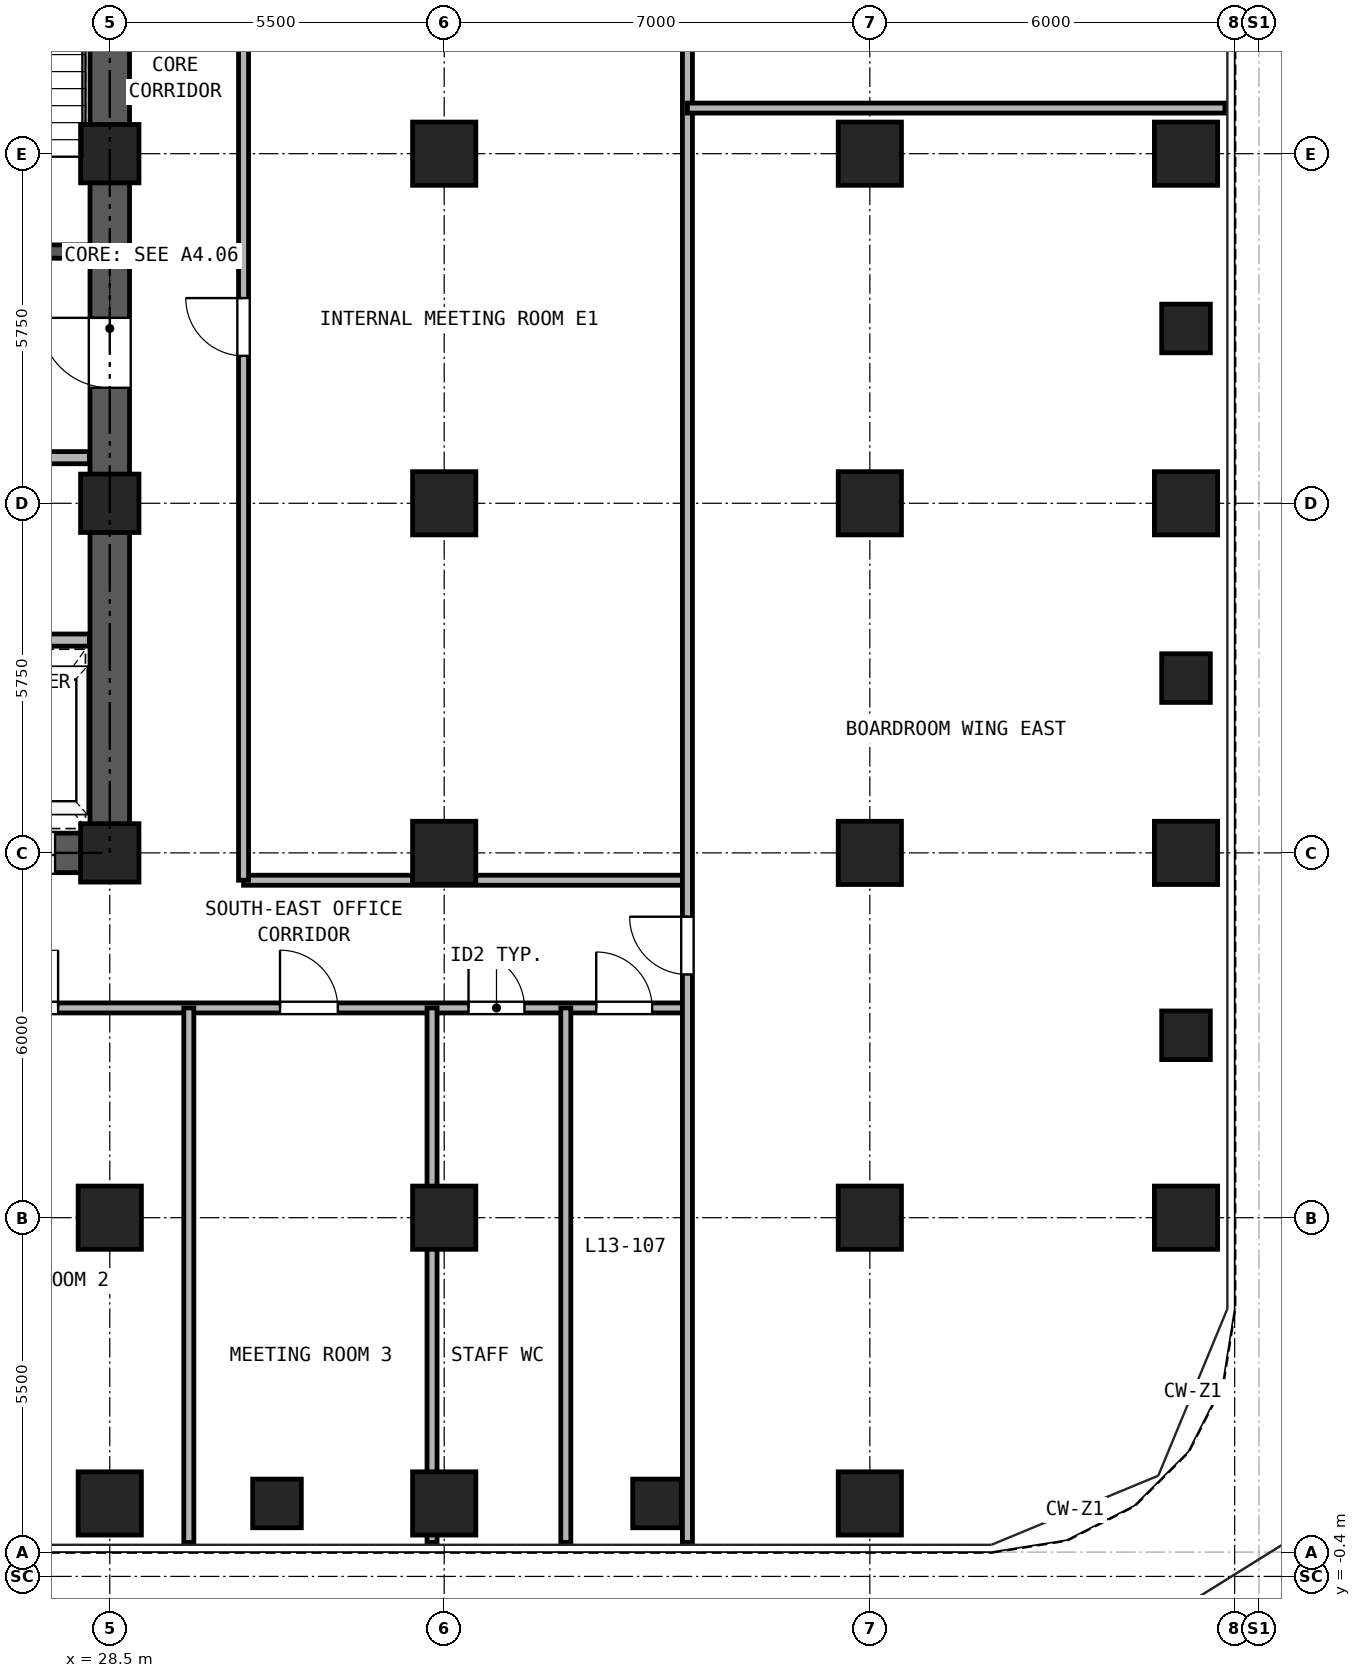
"""IFC4 building model, lengths in metres.
Left out: names, types, materials, properties, quantities, classifications, styles, units other than length and angle.
Written with IfcOpenShell. Run it as: python <this file> out.ifc"""

import sys

from ifc_helpers import new_model, si_unit, direction, frame, frame_2d, origin, origin_2d, place, context, subcontext, project, spatial, rectangle, hollow_rectangle, extrude, source, transform, mapped, element, fill, save


model = new_model("IFC4")
c1 = context("Model", 3, precision=1e-05, world=origin(), true_north=direction((0.0, 1.0)))
c2 = subcontext(c1, "Body", "Model", "MODEL_VIEW")
j1 = project(units=[si_unit("LENGTHUNIT", "METRE"), si_unit("PLANEANGLEUNIT", "RADIAN")], contexts=[c1])
p1 = place(None, origin())
s1 = spatial("IfcSite", under=j1, at=p1, CompositionType="ELEMENT")
p2 = place(p1, origin())
s2 = spatial("IfcBuilding", under=s1, at=p2, CompositionType="ELEMENT")
p3 = place(p2, frame((0.0, 0.0, 51.3)))
s3 = spatial("IfcBuildingStorey", under=s2, at=p3, CompositionType="ELEMENT", Elevation=51.3)
m1 = source(origin(), c2, "Body", "SweptSolid", [
    extrude(hollow_rectangle(XDim=1.04, YDim=1.04, WallThickness=0.065, at=origin_2d()), origin(), (0.0, 0.0, 1.0), 3.32),
])
for number, where, z_axis, x_axis in (
    (1, (28.5, 0.8, 0.0), (0.0, 0.0, 1.0), (1.0, 0.0, 0.0)),
    (2, (34.0, 0.8, 0.0), (0.0, 0.0, 1.0), (1.0, 0.0, 0.0)),
    (3, (41.0, 0.8, 0.0), (0.0, 0.0, 1.0), (1.0, 0.0, 0.0)),
    (4, (46.2, 5.5, 0.0), (0.0, 0.0, 1.0), (1.0, 0.0, 0.0)),
    (5, (46.2, 11.5, 0.0), (0.0, 0.0, 1.0), (1.0, 0.0, 0.0)),
    (6, (46.2, 17.25, 0.0), (0.0, 0.0, 1.0), (1.0, 0.0, 0.0)),
    (7, (46.2, 23.0, 0.0), (0.0, 0.0, 1.0), (1.0, 0.0, 0.0)),
    (8, (28.5, 5.5, 0.0), (0.0, 0.0, 1.0), (1.0, 0.0, 0.0)),
):
    element("IfcColumn", number, at=place(p3, frame(where, z_axis=z_axis, x_axis=x_axis)), inside=s3, PredefinedType="COLUMN", context=c2, shape_type="MappedRepresentation", body=[
        mapped(m1, transform((0.0, 0.0, 0.0), x_axis=(1.0, 0.0, 0.0), y_axis=(0.0, 1.0, 0.0), z_axis=(0.0, 0.0, 1.0), scale=1.0)),
    ])
m2 = source(origin(), c2, "Body", "SweptSolid", [
    extrude(hollow_rectangle(XDim=0.96, YDim=0.96, WallThickness=0.06, at=origin_2d()), origin(), (0.0, 0.0, 1.0), 3.32),
])
for number, where, z_axis, x_axis in (
    (9, (28.5, 11.5, 0.0), (0.0, 0.0, 1.0), (1.0, 0.0, 0.0)),
    (10, (28.5, 17.25, 0.0), (0.0, 0.0, 1.0), (1.0, 0.0, 0.0)),
    (11, (28.5, 23.0, 0.0), (0.0, 0.0, 1.0), (1.0, 0.0, 0.0)),
):
    element("IfcColumn", number, at=place(p3, frame(where, z_axis=z_axis, x_axis=x_axis)), inside=s3, PredefinedType="COLUMN", context=c2, shape_type="MappedRepresentation", body=[
        mapped(m2, transform((0.0, 0.0, 0.0), x_axis=(1.0, 0.0, 0.0), y_axis=(0.0, 1.0, 0.0), z_axis=(0.0, 0.0, 1.0), scale=1.0)),
    ])
for number, where, z_axis, x_axis in (
    (12, (34.0, 5.5, 0.0), (0.0, 0.0, 1.0), (1.0, 0.0, 0.0)),
    (13, (34.0, 11.5, 0.0), (0.0, 0.0, 1.0), (1.0, 0.0, 0.0)),
    (14, (34.0, 17.25, 0.0), (0.0, 0.0, 1.0), (1.0, 0.0, 0.0)),
    (15, (34.0, 23.0, 0.0), (0.0, 0.0, 1.0), (1.0, 0.0, 0.0)),
    (16, (41.0, 5.5, 0.0), (0.0, 0.0, 1.0), (1.0, 0.0, 0.0)),
    (17, (41.0, 11.5, 0.0), (0.0, 0.0, 1.0), (1.0, 0.0, 0.0)),
    (18, (41.0, 17.25, 0.0), (0.0, 0.0, 1.0), (1.0, 0.0, 0.0)),
    (19, (41.0, 23.0, 0.0), (0.0, 0.0, 1.0), (1.0, 0.0, 0.0)),
):
    element("IfcColumn", number, at=place(p3, frame(where, z_axis=z_axis, x_axis=x_axis)), inside=s3, PredefinedType="COLUMN", context=c2, shape_type="MappedRepresentation", body=[
        mapped(m1, transform((0.0, 0.0, 0.0), x_axis=(1.0, 0.0, 0.0), y_axis=(0.0, 1.0, 0.0), z_axis=(0.0, 0.0, 1.0), scale=1.0)),
    ])
m3 = source(origin(), c2, "Body", "SweptSolid", [
    extrude(hollow_rectangle(XDim=0.8, YDim=0.8, WallThickness=0.045, at=origin_2d()), origin(), (0.0, 0.0, 1.0), 3.32),
])
for number, where, z_axis, x_axis in (
    (20, (31.25, 0.8, 0.0), (0.0, 0.0, 1.0), (1.0, 0.0, 0.0)),
    (21, (37.5, 0.8, 0.0), (0.0, 0.0, 1.0), (1.0, 0.0, 0.0)),
    (22, (46.2, 8.5, 0.0), (0.0, 0.0, 1.0), (1.0, 0.0, 0.0)),
    (23, (46.2, 14.375, 0.0), (0.0, 0.0, 1.0), (1.0, 0.0, 0.0)),
    (24, (46.2, 20.125, 0.0), (0.0, 0.0, 1.0), (1.0, 0.0, 0.0)),
):
    element("IfcColumn", number, at=place(p3, frame(where, z_axis=z_axis, x_axis=x_axis)), inside=s3, PredefinedType="COLUMN", context=c2, shape_type="MappedRepresentation", body=[
        mapped(m3, transform((0.0, 0.0, 0.0), x_axis=(1.0, 0.0, 0.0), y_axis=(0.0, 1.0, 0.0), z_axis=(0.0, 0.0, 1.0), scale=1.0)),
    ])
p4 = place(p3, frame((18.175, 11.5, 0.0), z_axis=(0.0, 0.0, 1.0), x_axis=(1.0, 0.0, 0.0)))
e25 = element("IfcWall", 25, at=p4, inside=s3, PredefinedType="SHEAR", context=c2, shape_type="SweptSolid", body=[
    extrude(rectangle(XDim=10.65, YDim=0.65, at=frame_2d((5.325, 0.0))), origin(), (0.0, 0.0, 1.0), 3.32),
])
p5 = place(p4, frame((1.195, 0.0, 0.0)))
e26 = element("IfcOpeningElement", 26, at=p5, cuts=e25, PredefinedType="OPENING", context=c2, shape_type="SweptSolid", body=[
    extrude(rectangle(XDim=1.1, YDim=2.25, at=frame_2d((0.55, 1.125))), frame((0.0, 0.335, 0.0), z_axis=(0.0, -1.0, 0.0), x_axis=(1.0, 0.0, 0.0)), (0.0, 0.0, 1.0), 0.67),
])
p6 = place(p4, frame((3.495, 0.0, 0.0)))
e27 = element("IfcOpeningElement", 27, at=p6, cuts=e25, PredefinedType="OPENING", context=c2, shape_type="SweptSolid", body=[
    extrude(rectangle(XDim=1.1, YDim=2.25, at=frame_2d((0.55, 1.125))), frame((0.0, 0.335, 0.0), z_axis=(0.0, -1.0, 0.0), x_axis=(1.0, 0.0, 0.0)), (0.0, 0.0, 1.0), 0.67),
])
p7 = place(p4, frame((5.925, 0.0, 0.0)))
e28 = element("IfcOpeningElement", 28, at=p7, cuts=e25, PredefinedType="OPENING", context=c2, shape_type="SweptSolid", body=[
    extrude(rectangle(XDim=1.1, YDim=2.25, at=frame_2d((0.55, 1.125))), frame((0.0, 0.335, 0.0), z_axis=(0.0, -1.0, 0.0), x_axis=(1.0, 0.0, 0.0)), (0.0, 0.0, 1.0), 0.67),
])
p8 = place(p4, frame((8.325, 0.0, 0.0)))
e29 = element("IfcOpeningElement", 29, at=p8, cuts=e25, PredefinedType="OPENING", context=c2, shape_type="SweptSolid", body=[
    extrude(rectangle(XDim=1.1, YDim=2.25, at=frame_2d((0.55, 1.125))), frame((0.0, 0.335, 0.0), z_axis=(0.0, -1.0, 0.0), x_axis=(1.0, 0.0, 0.0)), (0.0, 0.0, 1.0), 0.67),
])
p9 = place(p3, frame((28.5, 11.825, 0.0), z_axis=(0.0, 0.0, 1.0), x_axis=(0.0, 1.0, 0.0)))
e30 = element("IfcWall", 30, at=p9, inside=s3, PredefinedType="SHEAR", context=c2, shape_type="SweptSolid", body=[
    extrude(rectangle(XDim=16.6, YDim=0.65, at=frame_2d((8.3, 0.0))), origin(), (0.0, 0.0, 1.0), 3.32),
])
p10 = place(p9, frame((7.325, 0.0, 0.0)))
e31 = element("IfcOpeningElement", 31, at=p10, cuts=e30, PredefinedType="OPENING", context=c2, shape_type="SweptSolid", body=[
    extrude(rectangle(XDim=1.15, YDim=2.2, at=frame_2d((0.575, 1.1))), frame((0.0, 0.335, 0.0), z_axis=(0.0, -1.0, 0.0), x_axis=(1.0, 0.0, 0.0)), (0.0, 0.0, 1.0), 0.67),
])
p11 = place(p3, frame((25.13, 21.39, 0.0), z_axis=(0.0, 0.0, 1.0), x_axis=(1.0, 0.0, 0.0)))
e32 = element("IfcWall", 32, at=p11, inside=s3, PredefinedType="SOLIDWALL", context=c2, shape_type="SweptSolid", body=[
    extrude(rectangle(XDim=3.035, YDim=0.22, at=frame_2d((1.518, 0.0))), origin(), (0.0, 0.0, 1.0), 3.32),
])
p12 = place(p11, frame((0.92, 0.0, 0.0)))
e33 = element("IfcOpeningElement", 33, at=p12, cuts=e32, PredefinedType="OPENING", context=c2, shape_type="SweptSolid", body=[
    extrude(rectangle(XDim=1.15, YDim=2.2, at=frame_2d((0.575, 1.1))), frame((0.0, 0.12, 0.0), z_axis=(0.0, -1.0, 0.0), x_axis=(1.0, 0.0, 0.0)), (0.0, 0.0, 1.0), 0.24),
])
p13 = place(p3, frame((18.835, 18.0, 0.0), z_axis=(0.0, 0.0, 1.0), x_axis=(1.0, 0.0, 0.0)))
e34 = element("IfcWall", 34, at=p13, inside=s3, PredefinedType="PARTITIONING", context=c2, shape_type="SweptSolid", body=[
    extrude(rectangle(XDim=9.33, YDim=0.2, at=frame_2d((4.665, 0.0))), origin(), (0.0, 0.0, 1.0), 3.32),
])
p14 = place(p13, frame((0.415, 0.0, 0.0)))
e35 = element("IfcOpeningElement", 35, at=p14, cuts=e34, PredefinedType="OPENING", context=c2, shape_type="SweptSolid", body=[
    extrude(rectangle(XDim=1.3, YDim=2.3, at=frame_2d((0.65, 1.15))), frame((0.0, 0.11, 0.0), z_axis=(0.0, -1.0, 0.0), x_axis=(1.0, 0.0, 0.0)), (0.0, 0.0, 1.0), 0.22),
])
p15 = place(p13, frame((2.515, 0.0, 0.0)))
e36 = element("IfcOpeningElement", 36, at=p15, cuts=e34, PredefinedType="OPENING", context=c2, shape_type="SweptSolid", body=[
    extrude(rectangle(XDim=1.3, YDim=2.3, at=frame_2d((0.65, 1.15))), frame((0.0, 0.11, 0.0), z_axis=(0.0, -1.0, 0.0), x_axis=(1.0, 0.0, 0.0)), (0.0, 0.0, 1.0), 0.22),
])
p16 = place(p13, frame((7.015, 0.0, 0.0)))
e37 = element("IfcOpeningElement", 37, at=p16, cuts=e34, PredefinedType="OPENING", context=c2, shape_type="SweptSolid", body=[
    extrude(rectangle(XDim=1.0, YDim=2.15, at=frame_2d((0.5, 1.075))), frame((0.0, 0.11, 0.0), z_axis=(0.0, -1.0, 0.0), x_axis=(1.0, 0.0, 0.0)), (0.0, 0.0, 1.0), 0.22),
])
p17 = place(p3, frame((18.835, 15.0, 0.0), z_axis=(0.0, 0.0, 1.0), x_axis=(1.0, 0.0, 0.0)))
e38 = element("IfcWall", 38, at=p17, inside=s3, PredefinedType="PARTITIONING", context=c2, shape_type="SweptSolid", body=[
    extrude(rectangle(XDim=9.33, YDim=0.2, at=frame_2d((4.665, 0.0))), origin(), (0.0, 0.0, 1.0), 3.32),
])
p18 = place(p3, frame((9.0, 8.95, 0.0), z_axis=(0.0, 0.0, 1.0), x_axis=(1.0, 0.0, 0.0)))
e39 = element("IfcWall", 39, at=p18, inside=s3, PredefinedType="PARTITIONING", context=c2, shape_type="SweptSolid", body=[
    extrude(rectangle(XDim=29.0, YDim=0.165, at=frame_2d((14.5, 0.0))), origin(), (0.0, 0.0, 1.0), 3.32),
])
p19 = place(p18, frame((2.1, 0.0, 0.0)))
e40 = element("IfcOpeningElement", 40, at=p19, cuts=e39, PredefinedType="OPENING", context=c2, shape_type="SweptSolid", body=[
    extrude(rectangle(XDim=0.95, YDim=2.15, at=frame_2d((0.475, 1.075))), frame((0.0, 0.093, 0.0), z_axis=(0.0, -1.0, 0.0), x_axis=(1.0, 0.0, 0.0)), (0.0, 0.0, 1.0), 0.185),
])
p20 = place(p18, frame((7.3, 0.0, 0.0)))
e41 = element("IfcOpeningElement", 41, at=p20, cuts=e39, PredefinedType="OPENING", context=c2, shape_type="SweptSolid", body=[
    extrude(rectangle(XDim=0.95, YDim=2.15, at=frame_2d((0.475, 1.075))), frame((0.0, 0.093, 0.0), z_axis=(0.0, -1.0, 0.0), x_axis=(1.0, 0.0, 0.0)), (0.0, 0.0, 1.0), 0.185),
])
p21 = place(p18, frame((12.5, 0.0, 0.0)))
e42 = element("IfcOpeningElement", 42, at=p21, cuts=e39, PredefinedType="OPENING", context=c2, shape_type="SweptSolid", body=[
    extrude(rectangle(XDim=0.95, YDim=2.15, at=frame_2d((0.475, 1.075))), frame((0.0, 0.093, 0.0), z_axis=(0.0, -1.0, 0.0), x_axis=(1.0, 0.0, 0.0)), (0.0, 0.0, 1.0), 0.185),
])
p22 = place(p18, frame((17.7, 0.0, 0.0)))
e43 = element("IfcOpeningElement", 43, at=p22, cuts=e39, PredefinedType="OPENING", context=c2, shape_type="SweptSolid", body=[
    extrude(rectangle(XDim=0.95, YDim=2.15, at=frame_2d((0.475, 1.075))), frame((0.0, 0.093, 0.0), z_axis=(0.0, -1.0, 0.0), x_axis=(1.0, 0.0, 0.0)), (0.0, 0.0, 1.0), 0.185),
])
p23 = place(p18, frame((22.3, 0.0, 0.0)))
e44 = element("IfcOpeningElement", 44, at=p23, cuts=e39, PredefinedType="OPENING", context=c2, shape_type="SweptSolid", body=[
    extrude(rectangle(XDim=0.95, YDim=2.15, at=frame_2d((0.475, 1.075))), frame((0.0, 0.093, 0.0), z_axis=(0.0, -1.0, 0.0), x_axis=(1.0, 0.0, 0.0)), (0.0, 0.0, 1.0), 0.185),
])
p24 = place(p18, frame((25.4, 0.0, 0.0)))
e45 = element("IfcOpeningElement", 45, at=p24, cuts=e39, PredefinedType="OPENING", context=c2, shape_type="SweptSolid", body=[
    extrude(rectangle(XDim=0.92, YDim=2.1, at=frame_2d((0.46, 1.05))), frame((0.0, 0.093, 0.0), z_axis=(0.0, -1.0, 0.0), x_axis=(1.0, 0.0, 0.0)), (0.0, 0.0, 1.0), 0.185),
])
p25 = place(p18, frame((27.5, 0.0, 0.0)))
e46 = element("IfcOpeningElement", 46, at=p25, cuts=e39, PredefinedType="OPENING", context=c2, shape_type="SweptSolid", body=[
    extrude(rectangle(XDim=0.92, YDim=2.1, at=frame_2d((0.46, 1.05))), frame((0.0, 0.093, 0.0), z_axis=(0.0, -1.0, 0.0), x_axis=(1.0, 0.0, 0.0)), (0.0, 0.0, 1.0), 0.185),
])
p26 = place(p3, frame((30.7, 11.05, 0.0), z_axis=(0.0, 0.0, 1.0), x_axis=(1.0, 0.0, 0.0)))
e47 = element("IfcWall", 47, at=p26, inside=s3, PredefinedType="PARTITIONING", context=c2, shape_type="SweptSolid", body=[
    extrude(rectangle(XDim=7.3, YDim=0.165, at=frame_2d((3.65, 0.0))), origin(), (0.0, 0.0, 1.0), 3.32),
])
p27 = place(p3, frame((30.7, 11.05, 0.0), z_axis=(0.0, 0.0, 1.0), x_axis=(0.0, 1.0, 0.0)))
e48 = element("IfcWall", 48, at=p27, inside=s3, PredefinedType="PARTITIONING", context=c2, shape_type="SweptSolid", body=[
    extrude(rectangle(XDim=18.25, YDim=0.165, at=frame_2d((9.125, 0.0))), origin(), (0.0, 0.0, 1.0), 3.32),
])
p28 = place(p27, frame((8.625, 0.0, 0.0)))
e49 = element("IfcOpeningElement", 49, at=p28, cuts=e48, PredefinedType="OPENING", context=c2, shape_type="SweptSolid", body=[
    extrude(rectangle(XDim=0.95, YDim=2.15, at=frame_2d((0.475, 1.075))), frame((0.0, 0.093, 0.0), z_axis=(0.0, -1.0, 0.0), x_axis=(1.0, 0.0, 0.0)), (0.0, 0.0, 1.0), 0.185),
])
p29 = place(p3, frame((38.0, 0.16, 0.0), z_axis=(0.0, 0.0, 1.0), x_axis=(0.0, 1.0, 0.0)))
e50 = element("IfcWall", 50, at=p29, inside=s3, PredefinedType="PARTITIONING", context=c2, shape_type="SweptSolid", body=[
    extrude(rectangle(XDim=40.18, YDim=0.165, at=frame_2d((20.09, 0.0))), origin(), (0.0, 0.0, 1.0), 3.32),
])
p30 = place(p29, frame((9.34, 0.0, 0.0)))
e51 = element("IfcOpeningElement", 51, at=p30, cuts=e50, PredefinedType="OPENING", context=c2, shape_type="SweptSolid", body=[
    extrude(rectangle(XDim=0.95, YDim=2.15, at=frame_2d((0.475, 1.075))), frame((0.0, 0.093, 0.0), z_axis=(0.0, -1.0, 0.0), x_axis=(1.0, 0.0, 0.0)), (0.0, 0.0, 1.0), 0.185),
])
p31 = place(p29, frame((29.69, 0.0, 0.0)))
e52 = element("IfcOpeningElement", 52, at=p31, cuts=e50, PredefinedType="OPENING", context=c2, shape_type="SweptSolid", body=[
    extrude(rectangle(XDim=0.95, YDim=2.15, at=frame_2d((0.475, 1.075))), frame((0.0, 0.093, 0.0), z_axis=(0.0, -1.0, 0.0), x_axis=(1.0, 0.0, 0.0)), (0.0, 0.0, 1.0), 0.185),
])
p32 = place(p3, frame((29.8, 0.16, 0.0), z_axis=(0.0, 0.0, 1.0), x_axis=(0.0, 1.0, 0.0)))
e53 = element("IfcWall", 53, at=p32, inside=s3, PredefinedType="PARTITIONING", context=c2, shape_type="SweptSolid", body=[
    extrude(rectangle(XDim=8.79, YDim=0.165, at=frame_2d((4.395, 0.0))), origin(), (0.0, 0.0, 1.0), 3.32),
])
p33 = place(p3, frame((33.8, 0.16, 0.0), z_axis=(0.0, 0.0, 1.0), x_axis=(0.0, 1.0, 0.0)))
e54 = element("IfcWall", 54, at=p33, inside=s3, PredefinedType="PARTITIONING", context=c2, shape_type="SweptSolid", body=[
    extrude(rectangle(XDim=8.79, YDim=0.165, at=frame_2d((4.395, 0.0))), origin(), (0.0, 0.0, 1.0), 2.539),
])
p34 = place(p3, frame((36.0, 0.16, 0.0), z_axis=(0.0, 0.0, 1.0), x_axis=(0.0, 1.0, 0.0)))
e55 = element("IfcWall", 55, at=p34, inside=s3, PredefinedType="PARTITIONING", context=c2, shape_type="SweptSolid", body=[
    extrude(rectangle(XDim=8.79, YDim=0.165, at=frame_2d((4.395, 0.0))), origin(), (0.0, 0.0, 1.0), 3.32),
])
p35 = place(p3, frame((38.0, 23.75, 0.0), z_axis=(0.0, 0.0, 1.0), x_axis=(1.0, 0.0, 0.0)))
e56 = element("IfcWall", 56, at=p35, inside=s3, PredefinedType="PARTITIONING", context=c2, shape_type="SweptSolid", body=[
    extrude(rectangle(XDim=8.84, YDim=0.165, at=frame_2d((4.42, 0.0))), origin(), (0.0, 0.0, 1.0), 3.32),
])
p36 = place(p10, origin())
e57 = element("IfcDoor", 57, at=p36, inside=s3, OperationType="SINGLE_SWING_RIGHT", PredefinedType="DOOR", context=c2, shape_type="SweptSolid", body=[
    extrude(rectangle(XDim=1.15, YDim=2.2, at=frame_2d((0.575, 1.1))), frame((0.0, 0.025, 0.0), z_axis=(0.0, -1.0, 0.0), x_axis=(1.0, 0.0, 0.0)), (0.0, 0.0, 1.0), 0.05),
])
fill(e31, e57)
p37 = place(p8, frame((1.1, 0.0, 0.0), z_axis=(0.0, 0.0, 1.0), x_axis=(-1.0, 0.0, 0.0)))
e58 = element("IfcDoor", 58, at=p37, inside=s3, OperationType="DOUBLE_DOOR_SLIDING", PredefinedType="DOOR", context=c2, shape_type="SweptSolid", body=[
    extrude(rectangle(XDim=1.1, YDim=2.25, at=frame_2d((0.55, 1.125))), frame((0.0, 0.025, 0.0), z_axis=(0.0, -1.0, 0.0), x_axis=(1.0, 0.0, 0.0)), (0.0, 0.0, 1.0), 0.05),
])
fill(e29, e58)
p38 = place(p22, frame((0.95, 0.0, 0.0), z_axis=(0.0, 0.0, 1.0), x_axis=(-1.0, 0.0, 0.0)))
e59 = element("IfcDoor", 59, at=p38, inside=s3, OperationType="SINGLE_SWING_RIGHT", PredefinedType="DOOR", context=c2, shape_type="SweptSolid", body=[
    extrude(rectangle(XDim=0.95, YDim=2.15, at=frame_2d((0.475, 1.075))), frame((0.0, 0.025, 0.0), z_axis=(0.0, -1.0, 0.0), x_axis=(1.0, 0.0, 0.0)), (0.0, 0.0, 1.0), 0.05),
])
fill(e43, e59)
p39 = place(p23, frame((0.95, 0.0, 0.0), z_axis=(0.0, 0.0, 1.0), x_axis=(-1.0, 0.0, 0.0)))
e60 = element("IfcDoor", 60, at=p39, inside=s3, OperationType="SINGLE_SWING_LEFT", PredefinedType="DOOR", context=c2, shape_type="SweptSolid", body=[
    extrude(rectangle(XDim=0.95, YDim=2.15, at=frame_2d((0.475, 1.075))), frame((0.0, 0.025, 0.0), z_axis=(0.0, -1.0, 0.0), x_axis=(1.0, 0.0, 0.0)), (0.0, 0.0, 1.0), 0.05),
])
fill(e44, e60)
p40 = place(p24, frame((0.92, 0.0, 0.0), z_axis=(0.0, 0.0, 1.0), x_axis=(-1.0, 0.0, 0.0)))
e61 = element("IfcDoor", 61, at=p40, inside=s3, OperationType="SINGLE_SWING_LEFT", PredefinedType="DOOR", context=c2, shape_type="SweptSolid", body=[
    extrude(rectangle(XDim=0.92, YDim=2.1, at=frame_2d((0.46, 1.05))), frame((0.0, 0.025, 0.0), z_axis=(0.0, -1.0, 0.0), x_axis=(1.0, 0.0, 0.0)), (0.0, 0.0, 1.0), 0.05),
])
fill(e45, e61)
p41 = place(p25, frame((0.92, 0.0, 0.0), z_axis=(0.0, 0.0, 1.0), x_axis=(-1.0, 0.0, 0.0)))
e62 = element("IfcDoor", 62, at=p41, inside=s3, OperationType="SINGLE_SWING_LEFT", PredefinedType="DOOR", context=c2, shape_type="SweptSolid", body=[
    extrude(rectangle(XDim=0.92, YDim=2.1, at=frame_2d((0.46, 1.05))), frame((0.0, 0.025, 0.0), z_axis=(0.0, -1.0, 0.0), x_axis=(1.0, 0.0, 0.0)), (0.0, 0.0, 1.0), 0.05),
])
fill(e46, e62)
p42 = place(p30, origin())
e63 = element("IfcDoor", 63, at=p42, inside=s3, OperationType="SINGLE_SWING_RIGHT", PredefinedType="DOOR", context=c2, shape_type="SweptSolid", body=[
    extrude(rectangle(XDim=0.95, YDim=2.15, at=frame_2d((0.475, 1.075))), frame((0.0, 0.025, 0.0), z_axis=(0.0, -1.0, 0.0), x_axis=(1.0, 0.0, 0.0)), (0.0, 0.0, 1.0), 0.05),
])
fill(e51, e63)
p43 = place(p28, origin())
e64 = element("IfcDoor", 64, at=p43, inside=s3, OperationType="SINGLE_SWING_RIGHT", PredefinedType="DOOR", context=c2, shape_type="SweptSolid", body=[
    extrude(rectangle(XDim=0.95, YDim=2.15, at=frame_2d((0.475, 1.075))), frame((0.0, 0.025, 0.0), z_axis=(0.0, -1.0, 0.0), x_axis=(1.0, 0.0, 0.0)), (0.0, 0.0, 1.0), 0.05),
])
fill(e49, e64)
save(model, sys.argv[1])
